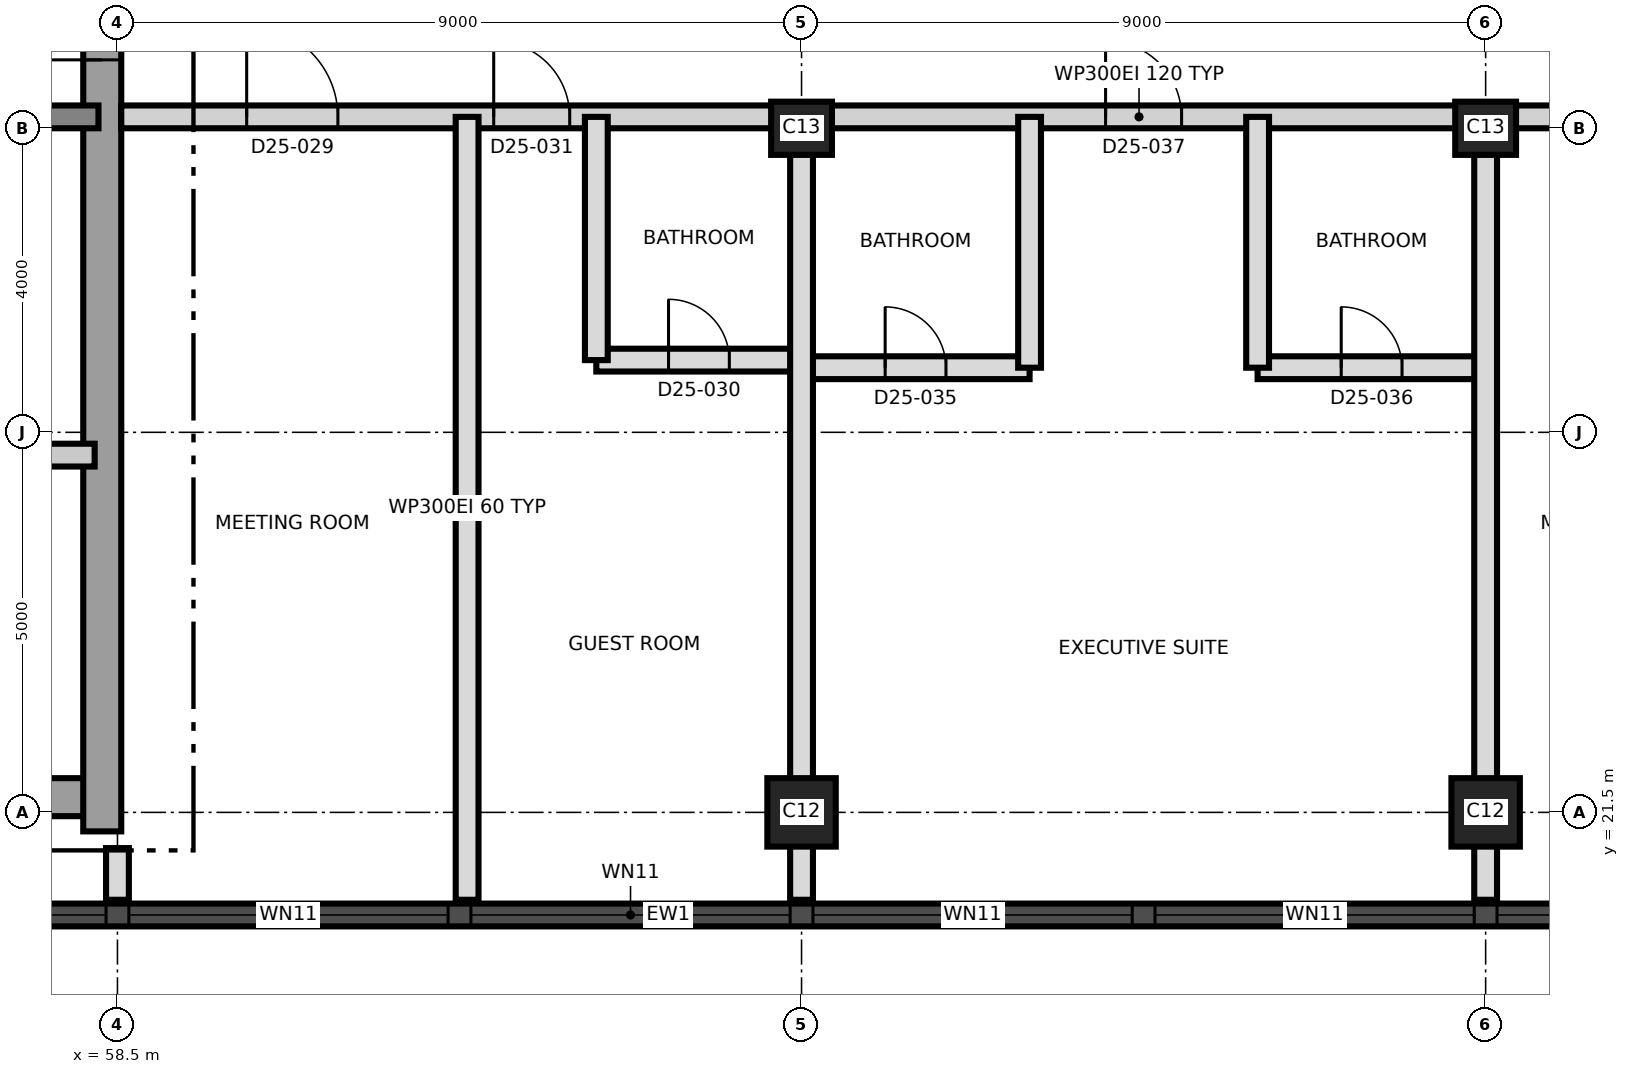
"""IFC4 building model, lengths in metres.
Left out: names, types, materials, properties, quantities, classifications, styles, units other than length and angle.
Written with IfcOpenShell. Run it as: python <this file> out.ifc"""

import sys

from ifc_helpers import new_model, si_unit, direction, frame, frame_2d, origin, origin_2d, place, context, subcontext, project, spatial, rectangle, extrude, element, fill, save


model = new_model("IFC4")
c1 = context("Model", 3, precision=1e-05, world=origin(), true_north=direction((0.0, 1.0)))
c2 = subcontext(c1, "Body", "Model", "MODEL_VIEW")
j1 = project(units=[si_unit("LENGTHUNIT", "METRE"), si_unit("PLANEANGLEUNIT", "RADIAN")], contexts=[c1])
p1 = place(None, origin())
s1 = spatial("IfcSite", under=j1, at=p1, CompositionType="ELEMENT")
p2 = place(p1, origin())
s2 = spatial("IfcBuilding", under=s1, at=p2, CompositionType="ELEMENT")
p3 = place(p2, frame((0.0, 0.0, 229.1)))
s3 = spatial("IfcBuildingStorey", under=s2, at=p3, CompositionType="ELEMENT", Elevation=229.1)
p4 = place(p3, frame((31.25, 21.7, 0.0), z_axis=(0.0, 0.0, 1.0), x_axis=(1.0, 0.0, 0.0)))
e1 = element("IfcWall", 1, at=p4, inside=s3, PredefinedType="SHEAR", context=c2, shape_type="SweptSolid", body=[
    extrude(rectangle(XDim=27.0, YDim=0.5, at=frame_2d((13.5, 0.0))), origin(), (0.0, 0.0, 1.0), 3.7),
])
p5 = place(p3, frame((58.3, 21.25, 0.0), z_axis=(0.0, 0.0, 1.0), x_axis=(0.0, 1.0, 0.0)))
e2 = element("IfcWall", 2, at=p5, inside=s3, PredefinedType="SHEAR", context=c2, shape_type="SweptSolid", body=[
    extrude(rectangle(XDim=18.5, YDim=0.5, at=frame_2d((9.25, 0.0))), origin(), (0.0, 0.0, 1.0), 3.7),
])
p6 = place(p5, frame((10.15, 0.0, 0.0)))
e3 = element("IfcOpeningElement", 3, at=p6, cuts=e2, PredefinedType="OPENING", context=c2, shape_type="SweptSolid", body=[
    extrude(rectangle(XDim=1.2, YDim=2.1, at=frame_2d((0.6, 1.05))), frame((0.0, 0.26, 0.0), z_axis=(0.0, -1.0, 0.0), x_axis=(1.0, 0.0, 0.0)), (0.0, 0.0, 1.0), 0.52),
])
p7 = place(p3, frame((31.75, 30.65, 0.0), z_axis=(0.0, 0.0, 1.0), x_axis=(1.0, 0.0, 0.0)))
e4 = element("IfcWall", 4, at=p7, inside=s3, PredefinedType="SHEAR", context=c2, shape_type="SweptSolid", body=[
    extrude(rectangle(XDim=26.5, YDim=0.3, at=frame_2d((13.25, 0.0))), origin(), (0.0, 0.0, 1.0), 3.7),
])
p8 = place(p7, frame((24.75, 0.0, 0.0)))
e5 = element("IfcOpeningElement", 5, at=p8, cuts=e4, PredefinedType="OPENING", context=c2, shape_type="SweptSolid", body=[
    extrude(rectangle(XDim=1.0, YDim=2.1, at=frame_2d((0.5, 1.05))), frame((0.0, 0.16, 0.0), z_axis=(0.0, -1.0, 0.0), x_axis=(1.0, 0.0, 0.0)), (0.0, 0.0, 1.0), 0.32),
])
p9 = place(p7, frame((4.05, 0.0, 0.0)))
e6 = element("IfcOpeningElement", 6, at=p9, cuts=e4, PredefinedType="OPENING", context=c2, shape_type="SweptSolid", body=[
    extrude(rectangle(XDim=1.0, YDim=2.1, at=frame_2d((0.5, 1.05))), frame((0.0, 0.16, 0.0), z_axis=(0.0, -1.0, 0.0), x_axis=(1.0, 0.0, 0.0)), (0.0, 0.0, 1.0), 0.32),
])
for number, where, z_axis, x_axis in (
    (7, (67.5, 21.5, 0.0), (0.0, 0.0, 1.0), (1.0, 0.0, 0.0)),
    (8, (76.5, 21.5, 0.0), (0.0, 0.0, 1.0), (1.0, 0.0, 0.0)),
):
    element("IfcColumn", number, at=place(p3, frame(where, z_axis=z_axis, x_axis=x_axis)), inside=s3, PredefinedType="COLUMN", context=c2, shape_type="SweptSolid", body=[
        extrude(rectangle(XDim=0.9, YDim=0.9, at=origin_2d()), origin(), (0.0, 0.0, 1.0), 3.7),
    ])
for number, where, z_axis, x_axis in (
    (9, (67.5, 30.5, 0.0), (0.0, 0.0, 1.0), (1.0, 0.0, 0.0)),
    (10, (76.5, 30.5, 0.0), (0.0, 0.0, 1.0), (1.0, 0.0, 0.0)),
):
    element("IfcColumn", number, at=place(p3, frame(where, z_axis=z_axis, x_axis=x_axis)), inside=s3, PredefinedType="COLUMN", context=c2, shape_type="SweptSolid", body=[
        extrude(rectangle(XDim=0.8, YDim=0.7, at=origin_2d()), origin(), (0.0, 0.0, 1.0), 3.7),
    ])
p10 = place(p3, frame((44.011, 20.15, 0.0), z_axis=(0.0, 0.0, 1.0), x_axis=(1.0, 0.0, 0.0)))
e11 = element("IfcWall", 11, at=p10, inside=s3, PredefinedType="SOLIDWALL", context=c2, shape_type="SweptSolid", body=[
    extrude(rectangle(XDim=43.476, YDim=0.3, at=frame_2d((21.738, 0.0))), origin(), (0.0, 0.0, 1.0), 3.4),
])
p11 = place(p10, frame((1.845, 0.0, 0.3)))
e12 = element("IfcOpeningElement", 12, at=p11, cuts=e11, PredefinedType="OPENING", context=c2, shape_type="SweptSolid", body=[
    extrude(rectangle(XDim=1.8, YDim=2.4, at=frame_2d((0.9, 1.2))), frame((0.0, 0.16, 0.0), z_axis=(0.0, -1.0, 0.0), x_axis=(1.0, 0.0, 0.0)), (0.0, 0.0, 1.0), 0.32),
])
p12 = place(p10, frame((5.639, 0.0, 0.9)))
e13 = element("IfcOpeningElement", 13, at=p12, cuts=e11, PredefinedType="OPENING", context=c2, shape_type="SweptSolid", body=[
    extrude(rectangle(XDim=4.2, YDim=1.5, at=frame_2d((2.1, 0.75))), frame((0.0, 0.16, 0.0), z_axis=(0.0, -1.0, 0.0), x_axis=(1.0, 0.0, 0.0)), (0.0, 0.0, 1.0), 0.32),
])
p13 = place(p10, frame((10.139, 0.0, 0.9)))
e14 = element("IfcOpeningElement", 14, at=p13, cuts=e11, PredefinedType="OPENING", context=c2, shape_type="SweptSolid", body=[
    extrude(rectangle(XDim=4.2, YDim=1.5, at=frame_2d((2.1, 0.75))), frame((0.0, 0.16, 0.0), z_axis=(0.0, -1.0, 0.0), x_axis=(1.0, 0.0, 0.0)), (0.0, 0.0, 1.0), 0.32),
])
p14 = place(p10, frame((14.639, 0.0, 0.9)))
e15 = element("IfcOpeningElement", 15, at=p14, cuts=e11, PredefinedType="OPENING", context=c2, shape_type="SweptSolid", body=[
    extrude(rectangle(XDim=4.2, YDim=1.5, at=frame_2d((2.1, 0.75))), frame((0.0, 0.16, 0.0), z_axis=(0.0, -1.0, 0.0), x_axis=(1.0, 0.0, 0.0)), (0.0, 0.0, 1.0), 0.32),
])
p15 = place(p10, frame((19.139, 0.0, 0.9)))
e16 = element("IfcOpeningElement", 16, at=p15, cuts=e11, PredefinedType="OPENING", context=c2, shape_type="SweptSolid", body=[
    extrude(rectangle(XDim=4.2, YDim=1.5, at=frame_2d((2.1, 0.75))), frame((0.0, 0.16, 0.0), z_axis=(0.0, -1.0, 0.0), x_axis=(1.0, 0.0, 0.0)), (0.0, 0.0, 1.0), 0.32),
])
p16 = place(p10, frame((23.639, 0.0, 0.9)))
e17 = element("IfcOpeningElement", 17, at=p16, cuts=e11, PredefinedType="OPENING", context=c2, shape_type="SweptSolid", body=[
    extrude(rectangle(XDim=4.2, YDim=1.5, at=frame_2d((2.1, 0.75))), frame((0.0, 0.16, 0.0), z_axis=(0.0, -1.0, 0.0), x_axis=(1.0, 0.0, 0.0)), (0.0, 0.0, 1.0), 0.32),
])
p17 = place(p10, frame((28.139, 0.0, 0.9)))
e18 = element("IfcOpeningElement", 18, at=p17, cuts=e11, PredefinedType="OPENING", context=c2, shape_type="SweptSolid", body=[
    extrude(rectangle(XDim=4.2, YDim=1.5, at=frame_2d((2.1, 0.75))), frame((0.0, 0.16, 0.0), z_axis=(0.0, -1.0, 0.0), x_axis=(1.0, 0.0, 0.0)), (0.0, 0.0, 1.0), 0.32),
])
p18 = place(p10, frame((32.639, 0.0, 0.9)))
e19 = element("IfcOpeningElement", 19, at=p18, cuts=e11, PredefinedType="OPENING", context=c2, shape_type="SweptSolid", body=[
    extrude(rectangle(XDim=4.2, YDim=1.5, at=frame_2d((2.1, 0.75))), frame((0.0, 0.16, 0.0), z_axis=(0.0, -1.0, 0.0), x_axis=(1.0, 0.0, 0.0)), (0.0, 0.0, 1.0), 0.32),
])
p19 = place(p10, frame((37.139, 0.0, 0.9)))
e20 = element("IfcOpeningElement", 20, at=p19, cuts=e11, PredefinedType="OPENING", context=c2, shape_type="SweptSolid", body=[
    extrude(rectangle(XDim=4.2, YDim=1.5, at=frame_2d((2.1, 0.75))), frame((0.0, 0.16, 0.0), z_axis=(0.0, -1.0, 0.0), x_axis=(1.0, 0.0, 0.0)), (0.0, 0.0, 1.0), 0.32),
])
p20 = place(p3, frame((55.8, 26.2, 0.0), z_axis=(0.0, 0.0, 1.0), x_axis=(1.0, 0.0, 0.0)))
e21 = element("IfcWall", 21, at=p20, inside=s3, PredefinedType="PARTITIONING", context=c2, shape_type="SweptSolid", body=[
    extrude(rectangle(XDim=2.4, YDim=0.3, at=frame_2d((1.2, 0.0))), origin(), (0.0, 0.0, 1.0), 3.4),
])
p21 = place(p20, frame((0.75, 0.0, 0.0)))
e22 = element("IfcOpeningElement", 22, at=p21, cuts=e21, PredefinedType="OPENING", context=c2, shape_type="SweptSolid", body=[
    extrude(rectangle(XDim=0.9, YDim=2.1, at=frame_2d((0.45, 1.05))), frame((0.0, 0.16, 0.0), z_axis=(0.0, -1.0, 0.0), x_axis=(1.0, 0.0, 0.0)), (0.0, 0.0, 1.0), 0.32),
])
p22 = place(p3, frame((67.5, 27.35, 0.0), z_axis=(0.0, 0.0, 1.0), x_axis=(1.0, 0.0, 0.0)))
e23 = element("IfcWall", 23, at=p22, inside=s3, PredefinedType="PARTITIONING", context=c2, shape_type="SweptSolid", body=[
    extrude(rectangle(XDim=3.0, YDim=0.3, at=frame_2d((1.5, 0.0))), origin(), (0.0, 0.0, 1.0), 3.4),
])
p23 = place(p22, frame((1.1, 0.0, 0.0)))
e24 = element("IfcOpeningElement", 24, at=p23, cuts=e23, PredefinedType="OPENING", context=c2, shape_type="SweptSolid", body=[
    extrude(rectangle(XDim=0.8, YDim=2.1, at=frame_2d((0.4, 1.05))), frame((0.0, 0.16, 0.0), z_axis=(0.0, -1.0, 0.0), x_axis=(1.0, 0.0, 0.0)), (0.0, 0.0, 1.0), 0.32),
])
p24 = place(p3, frame((73.5, 27.35, 0.0), z_axis=(0.0, 0.0, 1.0), x_axis=(1.0, 0.0, 0.0)))
e25 = element("IfcWall", 25, at=p24, inside=s3, PredefinedType="PARTITIONING", context=c2, shape_type="SweptSolid", body=[
    extrude(rectangle(XDim=3.0, YDim=0.3, at=frame_2d((1.5, 0.0))), origin(), (0.0, 0.0, 1.0), 3.4),
])
p25 = place(p24, frame((1.1, 0.0, 0.0)))
e26 = element("IfcOpeningElement", 26, at=p25, cuts=e25, PredefinedType="OPENING", context=c2, shape_type="SweptSolid", body=[
    extrude(rectangle(XDim=0.8, YDim=2.1, at=frame_2d((0.4, 1.05))), frame((0.0, 0.16, 0.0), z_axis=(0.0, -1.0, 0.0), x_axis=(1.0, 0.0, 0.0)), (0.0, 0.0, 1.0), 0.32),
])
p26 = place(p3, frame((64.8, 27.45, 0.0), z_axis=(0.0, 0.0, 1.0), x_axis=(1.0, 0.0, 0.0)))
e27 = element("IfcWall", 27, at=p26, inside=s3, PredefinedType="PARTITIONING", context=c2, shape_type="SweptSolid", body=[
    extrude(rectangle(XDim=2.7, YDim=0.3, at=frame_2d((1.35, 0.0))), origin(), (0.0, 0.0, 1.0), 3.4),
])
p27 = place(p26, frame((0.95, 0.0, 0.0)))
e28 = element("IfcOpeningElement", 28, at=p27, cuts=e27, PredefinedType="OPENING", context=c2, shape_type="SweptSolid", body=[
    extrude(rectangle(XDim=0.8, YDim=2.1, at=frame_2d((0.4, 1.05))), frame((0.0, 0.16, 0.0), z_axis=(0.0, -1.0, 0.0), x_axis=(1.0, 0.0, 0.0)), (0.0, 0.0, 1.0), 0.32),
])
p28 = place(p3, frame((58.55, 30.65, 0.0), z_axis=(0.0, 0.0, 1.0), x_axis=(1.0, 0.0, 0.0)))
e29 = element("IfcWall", 29, at=p28, inside=s3, PredefinedType="PARTITIONING", context=c2, shape_type="SweptSolid", body=[
    extrude(rectangle(XDim=26.78, YDim=0.3, at=frame_2d((13.39, 0.0))), origin(), (0.0, 0.0, 1.0), 3.4),
])
p29 = place(p28, frame((1.65, 0.0, 0.0)))
e30 = element("IfcOpeningElement", 30, at=p29, cuts=e29, PredefinedType="OPENING", context=c2, shape_type="SweptSolid", body=[
    extrude(rectangle(XDim=1.2, YDim=2.1, at=frame_2d((0.6, 1.05))), frame((0.0, 0.16, 0.0), z_axis=(0.0, -1.0, 0.0), x_axis=(1.0, 0.0, 0.0)), (0.0, 0.0, 1.0), 0.32),
])
p30 = place(p28, frame((4.9, 0.0, 0.0)))
e31 = element("IfcOpeningElement", 31, at=p30, cuts=e29, PredefinedType="OPENING", context=c2, shape_type="SweptSolid", body=[
    extrude(rectangle(XDim=1.0, YDim=2.1, at=frame_2d((0.5, 1.05))), frame((0.0, 0.16, 0.0), z_axis=(0.0, -1.0, 0.0), x_axis=(1.0, 0.0, 0.0)), (0.0, 0.0, 1.0), 0.32),
])
p31 = place(p28, frame((12.95, 0.0, 0.0)))
e32 = element("IfcOpeningElement", 32, at=p31, cuts=e29, PredefinedType="OPENING", context=c2, shape_type="SweptSolid", body=[
    extrude(rectangle(XDim=1.0, YDim=2.4, at=frame_2d((0.5, 1.2))), frame((0.0, 0.16, 0.0), z_axis=(0.0, -1.0, 0.0), x_axis=(1.0, 0.0, 0.0)), (0.0, 0.0, 1.0), 0.32),
])
p32 = place(p28, frame((19.085, 0.0, 0.0)))
e33 = element("IfcOpeningElement", 33, at=p32, cuts=e29, PredefinedType="OPENING", context=c2, shape_type="SweptSolid", body=[
    extrude(rectangle(XDim=1.2, YDim=2.1, at=frame_2d((0.6, 1.05))), frame((0.0, 0.16, 0.0), z_axis=(0.0, -1.0, 0.0), x_axis=(1.0, 0.0, 0.0)), (0.0, 0.0, 1.0), 0.32),
])
p33 = place(p28, frame((22.335, 0.0, 0.0)))
e34 = element("IfcOpeningElement", 34, at=p33, cuts=e29, PredefinedType="OPENING", context=c2, shape_type="SweptSolid", body=[
    extrude(rectangle(XDim=1.0, YDim=2.1, at=frame_2d((0.5, 1.05))), frame((0.0, 0.16, 0.0), z_axis=(0.0, -1.0, 0.0), x_axis=(1.0, 0.0, 0.0)), (0.0, 0.0, 1.0), 0.32),
])
p34 = place(p3, frame((58.5, 20.35, 0.0), z_axis=(0.0, 0.0, 1.0), x_axis=(0.0, 1.0, 0.0)))
e35 = element("IfcWall", 35, at=p34, inside=s3, PredefinedType="PARTITIONING", context=c2, shape_type="SweptSolid", body=[
    extrude(rectangle(XDim=0.68, YDim=0.3, at=frame_2d((0.34, 0.0))), origin(), (0.0, 0.0, 1.0), 3.4),
])
p35 = place(p3, frame((63.1, 20.35, 0.0), z_axis=(0.0, 0.0, 1.0), x_axis=(0.0, 1.0, 0.0)))
e36 = element("IfcWall", 36, at=p35, inside=s3, PredefinedType="PARTITIONING", context=c2, shape_type="SweptSolid", body=[
    extrude(rectangle(XDim=10.3, YDim=0.3, at=frame_2d((5.15, 0.0))), origin(), (0.0, 0.0, 1.0), 3.4),
])
p36 = place(p3, frame((64.8, 27.45, 0.0), z_axis=(0.0, 0.0, 1.0), x_axis=(0.0, 1.0, 0.0)))
e37 = element("IfcWall", 37, at=p36, inside=s3, PredefinedType="PARTITIONING", context=c2, shape_type="SweptSolid", body=[
    extrude(rectangle(XDim=3.2, YDim=0.3, at=frame_2d((1.6, 0.0))), origin(), (0.0, 0.0, 1.0), 3.4),
])
p37 = place(p3, frame((67.5, 20.35, 0.0), z_axis=(0.0, 0.0, 1.0), x_axis=(0.0, 1.0, 0.0)))
e38 = element("IfcWall", 38, at=p37, inside=s3, PredefinedType="PARTITIONING", context=c2, shape_type="SweptSolid", body=[
    extrude(rectangle(XDim=10.3, YDim=0.3, at=frame_2d((5.15, 0.0))), origin(), (0.0, 0.0, 1.0), 3.4),
])
for number, where, z_axis, x_axis in (
    (39, (70.5, 27.35, 0.0), (0.0, 0.0, 1.0), (0.0, 1.0, 0.0)),
    (40, (73.5, 27.35, 0.0), (0.0, 0.0, 1.0), (0.0, 1.0, 0.0)),
):
    element("IfcWall", number, at=place(p3, frame(where, z_axis=z_axis, x_axis=x_axis)), inside=s3, PredefinedType="PARTITIONING", context=c2, shape_type="SweptSolid", body=[
        extrude(rectangle(XDim=3.3, YDim=0.3, at=frame_2d((1.65, 0.0))), origin(), (0.0, 0.0, 1.0), 3.4),
    ])
p38 = place(p3, frame((76.5, 20.35, 0.0), z_axis=(0.0, 0.0, 1.0), x_axis=(0.0, 1.0, 0.0)))
e41 = element("IfcWall", 41, at=p38, inside=s3, PredefinedType="PARTITIONING", context=c2, shape_type="SweptSolid", body=[
    extrude(rectangle(XDim=10.3, YDim=0.3, at=frame_2d((5.15, 0.0))), origin(), (0.0, 0.0, 1.0), 3.4),
])
p39 = place(p13, origin())
e42 = element("IfcWindow", 42, at=p39, inside=s3, PartitioningType="SINGLE_PANEL", PredefinedType="WINDOW", context=c2, shape_type="SweptSolid", body=[
    extrude(rectangle(XDim=4.2, YDim=1.5, at=frame_2d((2.1, 0.75))), frame((0.0, 0.03, 0.0), z_axis=(0.0, -1.0, 0.0), x_axis=(1.0, 0.0, 0.0)), (0.0, 0.0, 1.0), 0.06),
])
fill(e14, e42)
p40 = place(p14, origin())
e43 = element("IfcWindow", 43, at=p40, inside=s3, PartitioningType="SINGLE_PANEL", PredefinedType="WINDOW", context=c2, shape_type="SweptSolid", body=[
    extrude(rectangle(XDim=4.2, YDim=1.5, at=frame_2d((2.1, 0.75))), frame((0.0, 0.03, 0.0), z_axis=(0.0, -1.0, 0.0), x_axis=(1.0, 0.0, 0.0)), (0.0, 0.0, 1.0), 0.06),
])
fill(e15, e43)
p41 = place(p15, origin())
e44 = element("IfcWindow", 44, at=p41, inside=s3, PartitioningType="SINGLE_PANEL", PredefinedType="WINDOW", context=c2, shape_type="SweptSolid", body=[
    extrude(rectangle(XDim=4.2, YDim=1.5, at=frame_2d((2.1, 0.75))), frame((0.0, 0.03, 0.0), z_axis=(0.0, -1.0, 0.0), x_axis=(1.0, 0.0, 0.0)), (0.0, 0.0, 1.0), 0.06),
])
fill(e16, e44)
p42 = place(p16, origin())
e45 = element("IfcWindow", 45, at=p42, inside=s3, PartitioningType="SINGLE_PANEL", PredefinedType="WINDOW", context=c2, shape_type="SweptSolid", body=[
    extrude(rectangle(XDim=4.2, YDim=1.5, at=frame_2d((2.1, 0.75))), frame((0.0, 0.03, 0.0), z_axis=(0.0, -1.0, 0.0), x_axis=(1.0, 0.0, 0.0)), (0.0, 0.0, 1.0), 0.06),
])
fill(e17, e45)
p43 = place(p17, origin())
e46 = element("IfcWindow", 46, at=p43, inside=s3, PartitioningType="SINGLE_PANEL", PredefinedType="WINDOW", context=c2, shape_type="SweptSolid", body=[
    extrude(rectangle(XDim=4.2, YDim=1.5, at=frame_2d((2.1, 0.75))), frame((0.0, 0.03, 0.0), z_axis=(0.0, -1.0, 0.0), x_axis=(1.0, 0.0, 0.0)), (0.0, 0.0, 1.0), 0.06),
])
fill(e18, e46)
p44 = place(p18, origin())
e47 = element("IfcWindow", 47, at=p44, inside=s3, PartitioningType="SINGLE_PANEL", PredefinedType="WINDOW", context=c2, shape_type="SweptSolid", body=[
    extrude(rectangle(XDim=4.2, YDim=1.5, at=frame_2d((2.1, 0.75))), frame((0.0, 0.03, 0.0), z_axis=(0.0, -1.0, 0.0), x_axis=(1.0, 0.0, 0.0)), (0.0, 0.0, 1.0), 0.06),
])
fill(e19, e47)
p45 = place(p6, origin())
e48 = element("IfcDoor", 48, at=p45, inside=s3, OperationType="SINGLE_SWING_LEFT", PredefinedType="DOOR", context=c2, shape_type="SweptSolid", body=[
    extrude(rectangle(XDim=1.2, YDim=2.1, at=frame_2d((0.6, 1.05))), frame((0.0, 0.025, 0.0), z_axis=(0.0, -1.0, 0.0), x_axis=(1.0, 0.0, 0.0)), (0.0, 0.0, 1.0), 0.05),
])
fill(e3, e48)
p46 = place(p29, origin())
e49 = element("IfcDoor", 49, at=p46, inside=s3, OperationType="SINGLE_SWING_LEFT", PredefinedType="DOOR", context=c2, shape_type="SweptSolid", body=[
    extrude(rectangle(XDim=1.2, YDim=2.1, at=frame_2d((0.6, 1.05))), frame((0.0, 0.025, 0.0), z_axis=(0.0, -1.0, 0.0), x_axis=(1.0, 0.0, 0.0)), (0.0, 0.0, 1.0), 0.05),
])
fill(e30, e49)
p47 = place(p27, origin())
e50 = element("IfcDoor", 50, at=p47, inside=s3, OperationType="SINGLE_SWING_RIGHT", PredefinedType="DOOR", context=c2, shape_type="SweptSolid", body=[
    extrude(rectangle(XDim=0.8, YDim=2.1, at=frame_2d((0.4, 1.05))), frame((0.0, 0.025, 0.0), z_axis=(0.0, -1.0, 0.0), x_axis=(1.0, 0.0, 0.0)), (0.0, 0.0, 1.0), 0.05),
])
fill(e28, e50)
p48 = place(p30, origin())
e51 = element("IfcDoor", 51, at=p48, inside=s3, OperationType="SINGLE_SWING_LEFT", PredefinedType="DOOR", context=c2, shape_type="SweptSolid", body=[
    extrude(rectangle(XDim=1.0, YDim=2.1, at=frame_2d((0.5, 1.05))), frame((0.0, 0.025, 0.0), z_axis=(0.0, -1.0, 0.0), x_axis=(1.0, 0.0, 0.0)), (0.0, 0.0, 1.0), 0.05),
])
fill(e31, e51)
p49 = place(p23, origin())
e52 = element("IfcDoor", 52, at=p49, inside=s3, OperationType="SINGLE_SWING_LEFT", PredefinedType="DOOR", context=c2, shape_type="SweptSolid", body=[
    extrude(rectangle(XDim=0.8, YDim=2.1, at=frame_2d((0.4, 1.05))), frame((0.0, 0.025, 0.0), z_axis=(0.0, -1.0, 0.0), x_axis=(1.0, 0.0, 0.0)), (0.0, 0.0, 1.0), 0.05),
])
fill(e24, e52)
p50 = place(p25, origin())
e53 = element("IfcDoor", 53, at=p50, inside=s3, OperationType="SINGLE_SWING_RIGHT", PredefinedType="DOOR", context=c2, shape_type="SweptSolid", body=[
    extrude(rectangle(XDim=0.8, YDim=2.1, at=frame_2d((0.4, 1.05))), frame((0.0, 0.025, 0.0), z_axis=(0.0, -1.0, 0.0), x_axis=(1.0, 0.0, 0.0)), (0.0, 0.0, 1.0), 0.05),
])
fill(e26, e53)
p51 = place(p31, origin())
e54 = element("IfcDoor", 54, at=p51, inside=s3, OperationType="SINGLE_SWING_LEFT", PredefinedType="DOOR", context=c2, shape_type="SweptSolid", body=[
    extrude(rectangle(XDim=1.0, YDim=2.4, at=frame_2d((0.5, 1.2))), frame((0.0, 0.025, 0.0), z_axis=(0.0, -1.0, 0.0), x_axis=(1.0, 0.0, 0.0)), (0.0, 0.0, 1.0), 0.05),
])
fill(e32, e54)
save(model, sys.argv[1])
